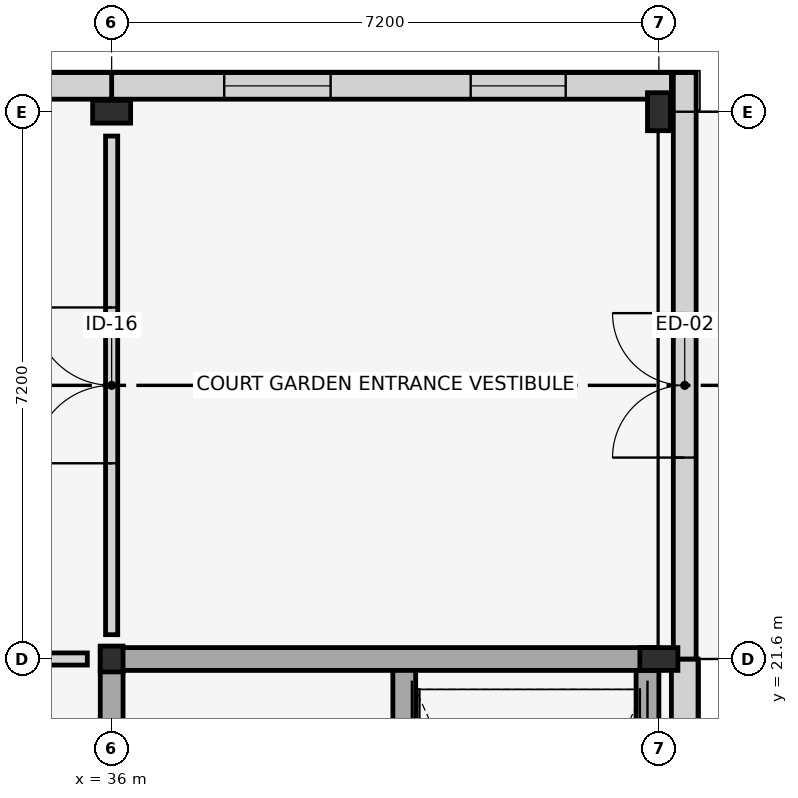
"""IFC4 building model, lengths in metres.
Left out: names, types, materials, properties, quantities, classifications, styles, units other than length and angle.
Written with IfcOpenShell. Run it as: python <this file> out.ifc"""

import sys

from ifc_helpers import new_model, si_unit, direction, frame, frame_2d, origin, origin_2d, place, context, subcontext, project, spatial, rectangle, i_section, extrude, element, fill, save


model = new_model("IFC4")
c1 = context("Model", 3, precision=1e-05, world=origin(), true_north=direction((0.0, 1.0)))
c2 = subcontext(c1, "Body", "Model", "MODEL_VIEW")
j1 = project(units=[si_unit("LENGTHUNIT", "METRE"), si_unit("PLANEANGLEUNIT", "RADIAN")], contexts=[c1])
p1 = place(None, origin())
s1 = spatial("IfcSite", under=j1, at=p1, CompositionType="ELEMENT")
p2 = place(p1, origin())
s2 = spatial("IfcBuilding", under=s1, at=p2, CompositionType="ELEMENT")
p3 = place(p2, origin())
s3 = spatial("IfcBuildingStorey", under=s2, at=p3, CompositionType="ELEMENT", Elevation=0.0)
p4 = place(p3, frame((36.0, 21.6, 0.0), z_axis=(0.0, 0.0, 1.0), x_axis=(1.0, 0.0, 0.0)))
e1 = element("IfcColumn", 1, at=p4, inside=s3, PredefinedType="COLUMN", context=c2, shape_type="SweptSolid", body=[
    extrude(i_section(OverallWidth=0.3, OverallDepth=0.34, WebThickness=0.012, FlangeThickness=0.021, FilletRadius=0.027, at=origin_2d()), origin(), (0.0, 0.0, 1.0), 4.5),
])
for number, where, z_axis, x_axis in (
    (2, (36.0, 28.8, 0.0), (0.0, 0.0, 1.0), (0.0, 1.0, 0.0)),
    (3, (43.2, 21.6, 0.0), (0.0, 0.0, 1.0), (0.0, 1.0, 0.0)),
    (4, (43.2, 28.8, 0.0), (0.0, 0.0, 1.0), (1.0, 0.0, 0.0)),
):
    element("IfcColumn", number, at=place(p3, frame(where, z_axis=z_axis, x_axis=x_axis)), inside=s3, PredefinedType="COLUMN", context=c2, shape_type="SweptSolid", body=[
        extrude(i_section(OverallWidth=0.3, OverallDepth=0.5, WebThickness=0.014, FlangeThickness=0.028, FilletRadius=0.027, at=origin_2d()), origin(), (0.0, 0.0, 1.0), 4.5),
    ])
p5 = place(p3, frame((43.54, 14.4, 0.0), z_axis=(0.0, 0.0, 1.0), x_axis=(0.0, 1.0, 0.0)))
e5 = element("IfcWall", 5, at=p5, inside=s3, PredefinedType="STANDARD", context=c2, shape_type="SweptSolid", body=[
    extrude(rectangle(XDim=7.2, YDim=0.35, at=frame_2d((3.6, 0.0))), origin(), (0.0, 0.0, 1.0), 4.5),
])
p6 = place(p3, frame((43.54, 21.6, 0.0), z_axis=(0.0, 0.0, 1.0), x_axis=(0.0, 1.0, 0.0)))
e6 = element("IfcWall", 6, at=p6, inside=s3, PredefinedType="STANDARD", context=c2, shape_type="SweptSolid", body=[
    extrude(rectangle(XDim=7.715, YDim=0.3, at=frame_2d((3.857, 0.0))), origin(), (0.0, 0.0, 1.0), 3.95),
])
p7 = place(p6, frame((2.65, 0.0, 0.0)))
e7 = element("IfcOpeningElement", 7, at=p7, cuts=e6, PredefinedType="OPENING", context=c2, shape_type="SweptSolid", body=[
    extrude(rectangle(XDim=1.9, YDim=2.45, at=frame_2d((0.95, 1.225))), frame((0.0, 0.16, 0.0), z_axis=(0.0, -1.0, 0.0), x_axis=(1.0, 0.0, 0.0)), (0.0, 0.0, 1.0), 0.32),
])
p8 = place(p3, frame((43.365, 29.14, 0.0), z_axis=(0.0, 0.0, 1.0), x_axis=(-1.0, 0.0, 0.0)))
e8 = element("IfcWall", 8, at=p8, inside=s3, PredefinedType="STANDARD", context=c2, shape_type="SweptSolid", body=[
    extrude(rectangle(XDim=7.365, YDim=0.35, at=frame_2d((3.683, 0.0))), origin(), (0.0, 0.0, 1.0), 4.5),
])
p9 = place(p8, frame((1.391, 0.0, 0.9)))
e9 = element("IfcOpeningElement", 9, at=p9, cuts=e8, PredefinedType="OPENING", context=c2, shape_type="SweptSolid", body=[
    extrude(rectangle(XDim=1.25, YDim=2.1, at=frame_2d((0.625, 1.05))), frame((0.0, 0.185, 0.0), z_axis=(0.0, -1.0, 0.0), x_axis=(1.0, 0.0, 0.0)), (0.0, 0.0, 1.0), 0.37),
])
p10 = place(p8, frame((4.484, 0.0, 0.9)))
e10 = element("IfcOpeningElement", 10, at=p10, cuts=e8, PredefinedType="OPENING", context=c2, shape_type="SweptSolid", body=[
    extrude(rectangle(XDim=1.4, YDim=2.3, at=frame_2d((0.7, 1.15))), frame((0.0, 0.185, 0.0), z_axis=(0.0, -1.0, 0.0), x_axis=(1.0, 0.0, 0.0)), (0.0, 0.0, 1.0), 0.37),
])
p11 = place(p3, frame((36.0, 29.14, 0.0), z_axis=(0.0, 0.0, 1.0), x_axis=(-1.0, 0.0, 0.0)))
e11 = element("IfcWall", 11, at=p11, inside=s3, PredefinedType="STANDARD", context=c2, shape_type="SweptSolid", body=[
    extrude(rectangle(XDim=7.2, YDim=0.35, at=frame_2d((3.6, 0.0))), origin(), (0.0, 0.0, 1.0), 4.5),
])
p12 = place(p11, frame((1.241, 0.0, 0.9)))
e12 = element("IfcOpeningElement", 12, at=p12, cuts=e11, PredefinedType="OPENING", context=c2, shape_type="SweptSolid", body=[
    extrude(rectangle(XDim=1.55, YDim=2.35, at=frame_2d((0.775, 1.175))), frame((0.0, 0.185, 0.0), z_axis=(0.0, -1.0, 0.0), x_axis=(1.0, 0.0, 0.0)), (0.0, 0.0, 1.0), 0.37),
])
p13 = place(p11, frame((4.334, 0.0, 0.9)))
e13 = element("IfcOpeningElement", 13, at=p13, cuts=e11, PredefinedType="OPENING", context=c2, shape_type="SweptSolid", body=[
    extrude(rectangle(XDim=1.7, YDim=2.4, at=frame_2d((0.85, 1.2))), frame((0.0, 0.185, 0.0), z_axis=(0.0, -1.0, 0.0), x_axis=(1.0, 0.0, 0.0)), (0.0, 0.0, 1.0), 0.37),
])
p14 = place(p3, frame((35.85, 21.6, 0.0), z_axis=(0.0, 0.0, 1.0), x_axis=(1.0, 0.0, 0.0)))
e14 = element("IfcWall", 14, at=p14, inside=s3, PredefinedType="SHEAR", context=c2, shape_type="SweptSolid", body=[
    extrude(rectangle(XDim=7.35, YDim=0.3, at=frame_2d((3.675, 0.0))), origin(), (0.0, 0.0, 1.0), 4.28),
])
p15 = place(p3, frame((43.05, 14.4, 0.0), z_axis=(0.0, 0.0, 1.0), x_axis=(0.0, 1.0, 0.0)))
e15 = element("IfcWall", 15, at=p15, inside=s3, PredefinedType="SHEAR", context=c2, shape_type="SweptSolid", body=[
    extrude(rectangle(XDim=7.05, YDim=0.3, at=frame_2d((3.525, 0.0))), origin(), (0.0, 0.0, 1.0), 4.28),
])
p16 = place(p3, frame((36.0, 7.35, 0.0), z_axis=(0.0, 0.0, 1.0), x_axis=(0.0, 1.0, 0.0)))
e16 = element("IfcWall", 16, at=p16, inside=s3, PredefinedType="SHEAR", context=c2, shape_type="SweptSolid", body=[
    extrude(rectangle(XDim=14.1, YDim=0.3, at=frame_2d((7.05, 0.0))), origin(), (0.0, 0.0, 1.0), 4.28),
])
p17 = place(p16, frame((3.55, 0.0, 0.0)))
e17 = element("IfcOpeningElement", 17, at=p17, cuts=e16, PredefinedType="OPENING", context=c2, shape_type="SweptSolid", body=[
    extrude(rectangle(XDim=1.3, YDim=2.2, at=frame_2d((0.65, 1.1))), frame((0.0, 0.16, 0.0), z_axis=(0.0, -1.0, 0.0), x_axis=(1.0, 0.0, 0.0)), (0.0, 0.0, 1.0), 0.32),
])
p18 = place(p16, frame((7.85, 0.0, 0.0)))
e18 = element("IfcOpeningElement", 18, at=p18, cuts=e16, PredefinedType="OPENING", context=c2, shape_type="SweptSolid", body=[
    extrude(rectangle(XDim=1.05, YDim=2.15, at=frame_2d((0.525, 1.075))), frame((0.0, 0.16, 0.0), z_axis=(0.0, -1.0, 0.0), x_axis=(1.0, 0.0, 0.0)), (0.0, 0.0, 1.0), 0.32),
])
p19 = place(p16, frame((10.55, 0.0, 0.0)))
e19 = element("IfcOpeningElement", 19, at=p19, cuts=e16, PredefinedType="OPENING", context=c2, shape_type="SweptSolid", body=[
    extrude(rectangle(XDim=1.0, YDim=2.15, at=frame_2d((0.5, 1.075))), frame((0.0, 0.16, 0.0), z_axis=(0.0, -1.0, 0.0), x_axis=(1.0, 0.0, 0.0)), (0.0, 0.0, 1.0), 0.32),
])
p20 = place(p3, frame((39.85, 12.54, 0.0), z_axis=(0.0, 0.0, 1.0), x_axis=(0.0, 1.0, 0.0)))
e20 = element("IfcWall", 20, at=p20, inside=s3, PredefinedType="SHEAR", context=c2, shape_type="SweptSolid", body=[
    extrude(rectangle(XDim=8.91, YDim=0.3, at=frame_2d((4.455, 0.0))), origin(), (0.0, 0.0, 1.0), 4.28),
])
p21 = place(p3, frame((29.12, 21.6, 0.0), z_axis=(0.0, 0.0, 1.0), x_axis=(1.0, 0.0, 0.0)))
e21 = element("IfcWall", 21, at=p21, inside=s3, PredefinedType="PARTITIONING", context=c2, shape_type="SweptSolid", body=[
    extrude(rectangle(XDim=6.56, YDim=0.16, at=frame_2d((3.28, 0.0))), origin(), (0.0, 0.0, 1.0), 3.45),
])
p22 = place(p21, frame((2.405, 0.0, 0.0)))
e22 = element("IfcOpeningElement", 22, at=p22, cuts=e21, PredefinedType="OPENING", context=c2, shape_type="SweptSolid", body=[
    extrude(rectangle(XDim=1.75, YDim=2.45, at=frame_2d((0.875, 1.225))), frame((0.0, 0.09, 0.0), z_axis=(0.0, -1.0, 0.0), x_axis=(1.0, 0.0, 0.0)), (0.0, 0.0, 1.0), 0.18),
])
p23 = place(p3, frame((36.0, 21.92, 0.0), z_axis=(0.0, 0.0, 1.0), x_axis=(0.0, 1.0, 0.0)))
e23 = element("IfcWall", 23, at=p23, inside=s3, PredefinedType="PARTITIONING", context=c2, shape_type="SweptSolid", body=[
    extrude(rectangle(XDim=6.56, YDim=0.16, at=frame_2d((3.28, 0.0))), origin(), (0.0, 0.0, 1.0), 3.45),
])
p24 = place(p23, frame((2.255, 0.0, 0.0)))
e24 = element("IfcOpeningElement", 24, at=p24, cuts=e23, PredefinedType="OPENING", context=c2, shape_type="SweptSolid", body=[
    extrude(rectangle(XDim=2.05, YDim=2.55, at=frame_2d((1.025, 1.275))), frame((0.0, 0.09, 0.0), z_axis=(0.0, -1.0, 0.0), x_axis=(1.0, 0.0, 0.0)), (0.0, 0.0, 1.0), 0.18),
])
p25 = place(p7, origin())
e25 = element("IfcDoor", 25, at=p25, inside=s3, OperationType="DOUBLE_DOOR_SINGLE_SWING", PredefinedType="DOOR", context=c2, shape_type="SweptSolid", body=[
    extrude(rectangle(XDim=1.9, YDim=2.45, at=frame_2d((0.95, 1.225))), frame((0.0, 0.025, 0.0), z_axis=(0.0, -1.0, 0.0), x_axis=(1.0, 0.0, 0.0)), (0.0, 0.0, 1.0), 0.05),
])
fill(e7, e25)
p26 = place(p9, origin())
e26 = element("IfcWindow", 26, at=p26, inside=s3, PartitioningType="SINGLE_PANEL", PredefinedType="WINDOW", context=c2, shape_type="SweptSolid", body=[
    extrude(rectangle(XDim=1.25, YDim=2.1, at=frame_2d((0.625, 1.05))), frame((0.0, 0.03, 0.0), z_axis=(0.0, -1.0, 0.0), x_axis=(1.0, 0.0, 0.0)), (0.0, 0.0, 1.0), 0.06),
])
fill(e9, e26)
p27 = place(p10, origin())
e27 = element("IfcWindow", 27, at=p27, inside=s3, PartitioningType="SINGLE_PANEL", PredefinedType="WINDOW", context=c2, shape_type="SweptSolid", body=[
    extrude(rectangle(XDim=1.4, YDim=2.3, at=frame_2d((0.7, 1.15))), frame((0.0, 0.03, 0.0), z_axis=(0.0, -1.0, 0.0), x_axis=(1.0, 0.0, 0.0)), (0.0, 0.0, 1.0), 0.06),
])
fill(e10, e27)
p28 = place(p24, origin())
e28 = element("IfcDoor", 28, at=p28, inside=s3, OperationType="DOUBLE_DOOR_SINGLE_SWING", PredefinedType="DOOR", context=c2, shape_type="SweptSolid", body=[
    extrude(rectangle(XDim=2.05, YDim=2.55, at=frame_2d((1.025, 1.275))), frame((0.0, 0.025, 0.0), z_axis=(0.0, -1.0, 0.0), x_axis=(1.0, 0.0, 0.0)), (0.0, 0.0, 1.0), 0.05),
])
fill(e24, e28)
save(model, sys.argv[1])
